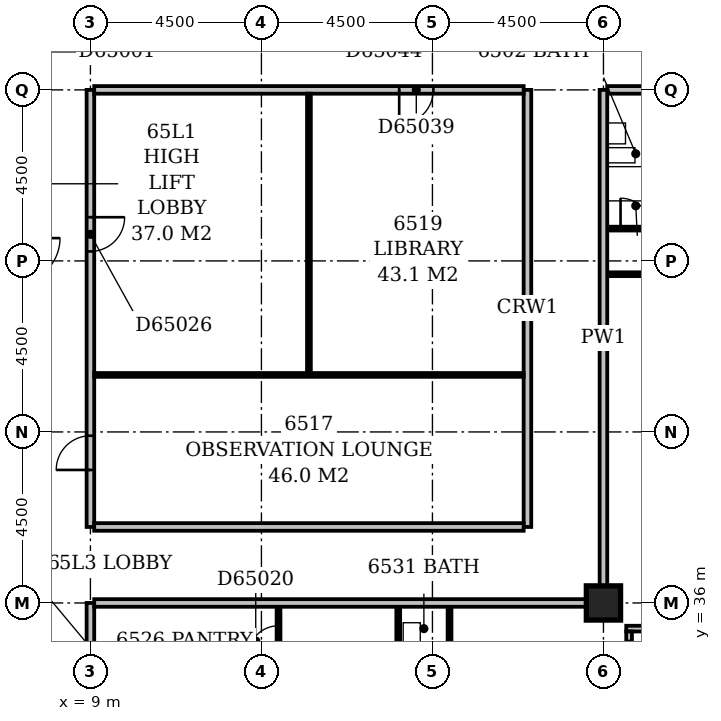
"""IFC4 building model, lengths in metres.
Left out: names, types, materials, properties, quantities, classifications, styles, units other than length and angle.
Written with IfcOpenShell. Run it as: python <this file> out.ifc"""

import sys

from ifc_helpers import new_model, si_unit, direction, frame, frame_2d, origin, origin_2d, place, context, subcontext, project, spatial, rectangle, extrude, element, fill, save


model = new_model("IFC4")
c1 = context("Model", 3, precision=1e-05, world=origin(), true_north=direction((0.0, 1.0)))
c2 = subcontext(c1, "Body", "Model", "MODEL_VIEW")
j1 = project(units=[si_unit("LENGTHUNIT", "METRE"), si_unit("PLANEANGLEUNIT", "RADIAN")], contexts=[c1])
p1 = place(None, origin())
s1 = spatial("IfcSite", under=j1, at=p1, CompositionType="ELEMENT")
p2 = place(p1, origin())
s2 = spatial("IfcBuilding", under=s1, at=p2, CompositionType="ELEMENT")
p3 = place(p2, frame((0.0, 0.0, 251.0)))
s3 = spatial("IfcBuildingStorey", under=s2, at=p3, CompositionType="ELEMENT", Elevation=251.0)
p4 = place(p3, frame((22.5, 36.0, -0.3), z_axis=(0.0, 0.0, 1.0), x_axis=(1.0, 0.0, 0.0)))
e1 = element("IfcColumn", 1, at=p4, inside=s3, PredefinedType="COLUMN", context=c2, shape_type="SweptSolid", body=[
    extrude(rectangle(XDim=0.9, YDim=0.9, at=origin_2d()), origin(), (0.0, 0.0, 1.0), 3.6),
])
p5 = place(p3, frame((23.175, 17.4, 0.0), z_axis=(0.0, 0.0, 1.0), x_axis=(0.0, 1.0, 0.0)))
e2 = element("IfcWall", 2, at=p5, inside=s3, PredefinedType="STANDARD", context=c2, shape_type="SweptSolid", body=[
    extrude(rectangle(XDim=17.85, YDim=0.15, at=frame_2d((8.925, 0.0))), origin(), (0.0, 0.0, 1.0), 2.7),
])
p6 = place(p5, frame((1.65, 0.0, 0.6)))
e3 = element("IfcOpeningElement", 3, at=p6, cuts=e2, PredefinedType="OPENING", context=c2, shape_type="SweptSolid", body=[
    extrude(rectangle(XDim=2.4, YDim=1.8, at=frame_2d((1.2, 0.9))), frame((0.0, 0.087, 0.0), z_axis=(0.0, -1.0, 0.0), x_axis=(1.0, 0.0, 0.0)), (0.0, 0.0, 1.0), 0.174),
])
p7 = place(p5, frame((6.15, 0.0, 0.6)))
e4 = element("IfcOpeningElement", 4, at=p7, cuts=e2, PredefinedType="OPENING", context=c2, shape_type="SweptSolid", body=[
    extrude(rectangle(XDim=2.4, YDim=1.8, at=frame_2d((1.2, 0.9))), frame((0.0, 0.087, 0.0), z_axis=(0.0, -1.0, 0.0), x_axis=(1.0, 0.0, 0.0)), (0.0, 0.0, 1.0), 0.174),
])
p8 = place(p5, frame((10.65, 0.0, 0.6)))
e5 = element("IfcOpeningElement", 5, at=p8, cuts=e2, PredefinedType="OPENING", context=c2, shape_type="SweptSolid", body=[
    extrude(rectangle(XDim=2.4, YDim=1.8, at=frame_2d((1.2, 0.9))), frame((0.0, 0.087, 0.0), z_axis=(0.0, -1.0, 0.0), x_axis=(1.0, 0.0, 0.0)), (0.0, 0.0, 1.0), 0.174),
])
p9 = place(p5, frame((15.202, 0.0, 0.6)))
e6 = element("IfcOpeningElement", 6, at=p9, cuts=e2, PredefinedType="OPENING", context=c2, shape_type="SweptSolid", body=[
    extrude(rectangle(XDim=2.4, YDim=1.8, at=frame_2d((1.2, 0.9))), frame((0.0, 0.087, 0.0), z_axis=(0.0, -1.0, 0.0), x_axis=(1.0, 0.0, 0.0)), (0.0, 0.0, 1.0), 0.174),
])
p10 = place(p3, frame((23.1, 35.325, 0.0), z_axis=(0.0, 0.0, 1.0), x_axis=(1.0, 0.0, 0.0)))
e7 = element("IfcWall", 7, at=p10, inside=s3, PredefinedType="STANDARD", context=c2, shape_type="SweptSolid", body=[
    extrude(rectangle(XDim=18.15, YDim=0.15, at=frame_2d((9.075, 0.0))), origin(), (0.0, 0.0, 1.0), 2.7),
])
p11 = place(p10, frame((0.45, 0.0, 0.6)))
e8 = element("IfcOpeningElement", 8, at=p11, cuts=e7, PredefinedType="OPENING", context=c2, shape_type="SweptSolid", body=[
    extrude(rectangle(XDim=2.4, YDim=1.8, at=frame_2d((1.2, 0.9))), frame((0.0, 0.087, 0.0), z_axis=(0.0, -1.0, 0.0), x_axis=(1.0, 0.0, 0.0)), (0.0, 0.0, 1.0), 0.174),
])
p12 = place(p10, frame((4.95, 0.0, 0.6)))
e9 = element("IfcOpeningElement", 9, at=p12, cuts=e7, PredefinedType="OPENING", context=c2, shape_type="SweptSolid", body=[
    extrude(rectangle(XDim=2.4, YDim=1.8, at=frame_2d((1.2, 0.9))), frame((0.0, 0.087, 0.0), z_axis=(0.0, -1.0, 0.0), x_axis=(1.0, 0.0, 0.0)), (0.0, 0.0, 1.0), 0.174),
])
p13 = place(p10, frame((9.45, 0.0, 0.6)))
e10 = element("IfcOpeningElement", 10, at=p13, cuts=e7, PredefinedType="OPENING", context=c2, shape_type="SweptSolid", body=[
    extrude(rectangle(XDim=2.4, YDim=1.8, at=frame_2d((1.2, 0.9))), frame((0.0, 0.087, 0.0), z_axis=(0.0, -1.0, 0.0), x_axis=(1.0, 0.0, 0.0)), (0.0, 0.0, 1.0), 0.174),
])
p14 = place(p10, frame((14.931, 0.0, 0.6)))
e11 = element("IfcOpeningElement", 11, at=p14, cuts=e7, PredefinedType="OPENING", context=c2, shape_type="SweptSolid", body=[
    extrude(rectangle(XDim=1.8, YDim=1.8, at=frame_2d((0.9, 0.9))), frame((0.0, 0.087, 0.0), z_axis=(0.0, -1.0, 0.0), x_axis=(1.0, 0.0, 0.0)), (0.0, 0.0, 1.0), 0.174),
])
p15 = place(p3, frame((17.1, 17.4, 0.0), z_axis=(0.0, 0.0, 1.0), x_axis=(0.0, 1.0, 0.0)))
e12 = element("IfcWall", 12, at=p15, inside=s3, PredefinedType="PARTITIONING", context=c2, shape_type="SweptSolid", body=[
    extrude(rectangle(XDim=18.5, YDim=0.1, at=frame_2d((9.25, 0.0))), origin(), (0.0, 0.0, 1.0), 3.3),
])
p16 = place(p15, frame((3.55, 0.0, 0.0)))
e13 = element("IfcOpeningElement", 13, at=p16, cuts=e12, PredefinedType="OPENING", context=c2, shape_type="SweptSolid", body=[
    extrude(rectangle(XDim=0.9, YDim=2.1, at=frame_2d((0.45, 1.05))), frame((0.0, 0.062, 0.0), z_axis=(0.0, -1.0, 0.0), x_axis=(1.0, 0.0, 0.0)), (0.0, 0.0, 1.0), 0.124),
])
p17 = place(p15, frame((9.1, 0.0, 0.0)))
e14 = element("IfcOpeningElement", 14, at=p17, cuts=e12, PredefinedType="OPENING", context=c2, shape_type="SweptSolid", body=[
    extrude(rectangle(XDim=0.9, YDim=2.1, at=frame_2d((0.45, 1.05))), frame((0.0, 0.062, 0.0), z_axis=(0.0, -1.0, 0.0), x_axis=(1.0, 0.0, 0.0)), (0.0, 0.0, 1.0), 0.124),
])
p18 = place(p15, frame((14.75, 0.0, 0.0)))
e15 = element("IfcOpeningElement", 15, at=p18, cuts=e12, PredefinedType="OPENING", context=c2, shape_type="SweptSolid", body=[
    extrude(rectangle(XDim=0.9, YDim=2.1, at=frame_2d((0.45, 1.05))), frame((0.0, 0.062, 0.0), z_axis=(0.0, -1.0, 0.0), x_axis=(1.0, 0.0, 0.0)), (0.0, 0.0, 1.0), 0.124),
])
p19 = place(p3, frame((9.0, 18.45, 0.0), z_axis=(0.0, 0.0, 1.0), x_axis=(0.0, 1.0, 0.0)))
e16 = element("IfcWall", 16, at=p19, inside=s3, PredefinedType="PARTITIONING", context=c2, shape_type="SweptSolid", body=[
    extrude(rectangle(XDim=17.55, YDim=0.2, at=frame_2d((8.775, 0.0))), origin(), (0.0, 0.0, 1.0), 3.3),
])
p20 = place(p19, frame((6.75, 0.0, 0.0)))
e17 = element("IfcOpeningElement", 17, at=p20, cuts=e16, PredefinedType="OPENING", context=c2, shape_type="SweptSolid", body=[
    extrude(rectangle(XDim=1.0, YDim=2.1, at=frame_2d((0.5, 1.05))), frame((0.0, 0.112, 0.0), z_axis=(0.0, -1.0, 0.0), x_axis=(1.0, 0.0, 0.0)), (0.0, 0.0, 1.0), 0.224),
])
p21 = place(p3, frame((13.95, 26.5, 0.0), z_axis=(0.0, 0.0, 1.0), x_axis=(0.0, 1.0, 0.0)))
e18 = element("IfcWall", 18, at=p21, inside=s3, PredefinedType="PARTITIONING", context=c2, shape_type="SweptSolid", body=[
    extrude(rectangle(XDim=9.4, YDim=0.1, at=frame_2d((4.7, 0.0))), origin(), (0.0, 0.0, 1.0), 3.3),
])
p22 = place(p21, frame((0.8, 0.0, 0.0)))
e19 = element("IfcOpeningElement", 19, at=p22, cuts=e18, PredefinedType="OPENING", context=c2, shape_type="SweptSolid", body=[
    extrude(rectangle(XDim=0.8, YDim=2.1, at=frame_2d((0.4, 1.05))), frame((0.0, 0.062, 0.0), z_axis=(0.0, -1.0, 0.0), x_axis=(1.0, 0.0, 0.0)), (0.0, 0.0, 1.0), 0.124),
])
p23 = place(p21, frame((8.1, 0.0, 0.0)))
e20 = element("IfcOpeningElement", 20, at=p23, cuts=e18, PredefinedType="OPENING", context=c2, shape_type="SweptSolid", body=[
    extrude(rectangle(XDim=0.8, YDim=2.1, at=frame_2d((0.4, 1.05))), frame((0.0, 0.062, 0.0), z_axis=(0.0, -1.0, 0.0), x_axis=(1.0, 0.0, 0.0)), (0.0, 0.0, 1.0), 0.124),
])
p24 = place(p21, frame((4.3, 0.0, 0.0)))
e21 = element("IfcOpeningElement", 21, at=p24, cuts=e18, PredefinedType="OPENING", context=c2, shape_type="SweptSolid", body=[
    extrude(rectangle(XDim=0.8, YDim=2.1, at=frame_2d((0.4, 1.05))), frame((0.0, 0.062, 0.0), z_axis=(0.0, -1.0, 0.0), x_axis=(1.0, 0.0, 0.0)), (0.0, 0.0, 1.0), 0.124),
])
p25 = place(p21, frame((6.1, 0.0, 0.0)))
e22 = element("IfcOpeningElement", 22, at=p25, cuts=e18, PredefinedType="OPENING", context=c2, shape_type="SweptSolid", body=[
    extrude(rectangle(XDim=0.8, YDim=2.1, at=frame_2d((0.4, 1.05))), frame((0.0, 0.062, 0.0), z_axis=(0.0, -1.0, 0.0), x_axis=(1.0, 0.0, 0.0)), (0.0, 0.0, 1.0), 0.124),
])
p26 = place(p21, frame((2.75, 0.0, 0.0)))
e23 = element("IfcOpeningElement", 23, at=p26, cuts=e18, PredefinedType="OPENING", context=c2, shape_type="SweptSolid", body=[
    extrude(rectangle(XDim=0.8, YDim=2.1, at=frame_2d((0.4, 1.05))), frame((0.0, 0.062, 0.0), z_axis=(0.0, -1.0, 0.0), x_axis=(1.0, 0.0, 0.0)), (0.0, 0.0, 1.0), 0.124),
])
p27 = place(p3, frame((18.45, 33.7, 0.0), z_axis=(0.0, 0.0, 1.0), x_axis=(0.0, 1.0, 0.0)))
e24 = element("IfcWall", 24, at=p27, inside=s3, PredefinedType="PLUMBINGWALL", context=c2, shape_type="SweptSolid", body=[
    extrude(rectangle(XDim=2.2, YDim=0.1, at=frame_2d((1.1, 0.0))), origin(), (0.0, 0.0, 1.0), 3.3),
])
p28 = place(p3, frame((9.1, 36.0, 0.0), z_axis=(0.0, 0.0, 1.0), x_axis=(1.0, 0.0, 0.0)))
e25 = element("IfcWall", 25, at=p28, inside=s3, PredefinedType="PARTITIONING", context=c2, shape_type="SweptSolid", body=[
    extrude(rectangle(XDim=12.95, YDim=0.2, at=frame_2d((6.475, 0.0))), origin(), (0.0, 0.0, 1.0), 3.3),
])
p29 = place(p3, frame((22.5, 36.45, 0.0), z_axis=(0.0, 0.0, 1.0), x_axis=(0.0, 1.0, 0.0)))
e26 = element("IfcWall", 26, at=p29, inside=s3, PredefinedType="PARTITIONING", context=c2, shape_type="SweptSolid", body=[
    extrude(rectangle(XDim=13.05, YDim=0.2, at=frame_2d((6.525, 0.0))), origin(), (0.0, 0.0, 1.0), 3.3),
])
p30 = place(p3, frame((9.0, 38.0, 0.0), z_axis=(0.0, 0.0, 1.0), x_axis=(0.0, 1.0, 0.0)))
e27 = element("IfcWall", 27, at=p30, inside=s3, PredefinedType="PARTITIONING", context=c2, shape_type="SweptSolid", body=[
    extrude(rectangle(XDim=11.5, YDim=0.2, at=frame_2d((5.75, 0.0))), origin(), (0.0, 0.0, 1.0), 3.3),
])
p31 = place(p30, frame((1.5, 0.0, 0.0)))
e28 = element("IfcOpeningElement", 28, at=p31, cuts=e27, PredefinedType="OPENING", context=c2, shape_type="SweptSolid", body=[
    extrude(rectangle(XDim=0.9, YDim=2.1, at=frame_2d((0.45, 1.05))), frame((0.0, 0.112, 0.0), z_axis=(0.0, -1.0, 0.0), x_axis=(1.0, 0.0, 0.0)), (0.0, 0.0, 1.0), 0.224),
])
p32 = place(p30, frame((7.25, 0.0, 0.0)))
e29 = element("IfcOpeningElement", 29, at=p32, cuts=e27, PredefinedType="OPENING", context=c2, shape_type="SweptSolid", body=[
    extrude(rectangle(XDim=0.9, YDim=2.1, at=frame_2d((0.45, 1.05))), frame((0.0, 0.112, 0.0), z_axis=(0.0, -1.0, 0.0), x_axis=(1.0, 0.0, 0.0)), (0.0, 0.0, 1.0), 0.224),
])
p33 = place(p3, frame((9.1, 38.0, 0.0), z_axis=(0.0, 0.0, 1.0), x_axis=(1.0, 0.0, 0.0)))
e30 = element("IfcWall", 30, at=p33, inside=s3, PredefinedType="PARTITIONING", context=c2, shape_type="SweptSolid", body=[
    extrude(rectangle(XDim=11.3, YDim=0.2, at=frame_2d((5.65, 0.0))), origin(), (0.0, 0.0, 1.0), 3.3),
])
p34 = place(p3, frame((20.5, 38.0, 0.0), z_axis=(0.0, 0.0, 1.0), x_axis=(0.0, 1.0, 0.0)))
e31 = element("IfcWall", 31, at=p34, inside=s3, PredefinedType="PARTITIONING", context=c2, shape_type="SweptSolid", body=[
    extrude(rectangle(XDim=11.5, YDim=0.2, at=frame_2d((5.75, 0.0))), origin(), (0.0, 0.0, 1.0), 3.3),
])
p35 = place(p3, frame((9.1, 42.0, 0.0), z_axis=(0.0, 0.0, 1.0), x_axis=(1.0, 0.0, 0.0)))
e32 = element("IfcWall", 32, at=p35, inside=s3, PredefinedType="PARTITIONING", context=c2, shape_type="SweptSolid", body=[
    extrude(rectangle(XDim=11.3, YDim=0.1, at=frame_2d((5.65, 0.0))), origin(), (0.0, 0.0, 1.0), 3.3),
])
p36 = place(p3, frame((14.75, 42.05, 0.0), z_axis=(0.0, 0.0, 1.0), x_axis=(0.0, 1.0, 0.0)))
e33 = element("IfcWall", 33, at=p36, inside=s3, PredefinedType="PARTITIONING", context=c2, shape_type="SweptSolid", body=[
    extrude(rectangle(XDim=7.35, YDim=0.1, at=frame_2d((3.675, 0.0))), origin(), (0.0, 0.0, 1.0), 3.3),
])
p37 = place(p3, frame((22.6, 44.65, 0.0), z_axis=(0.0, 0.0, 1.0), x_axis=(1.0, 0.0, 0.0)))
e34 = element("IfcWall", 34, at=p37, inside=s3, PredefinedType="PARTITIONING", context=c2, shape_type="SweptSolid", body=[
    extrude(rectangle(XDim=4.3, YDim=0.1, at=frame_2d((2.15, 0.0))), origin(), (0.0, 0.0, 1.0), 3.3),
])
p38 = place(p37, frame((1.7, 0.0, 0.0)))
e35 = element("IfcOpeningElement", 35, at=p38, cuts=e34, PredefinedType="OPENING", context=c2, shape_type="SweptSolid", body=[
    extrude(rectangle(XDim=0.9, YDim=2.1, at=frame_2d((0.45, 1.05))), frame((0.0, 0.062, 0.0), z_axis=(0.0, -1.0, 0.0), x_axis=(1.0, 0.0, 0.0)), (0.0, 0.0, 1.0), 0.124),
])
p39 = place(p3, frame((22.6, 45.85, 0.0), z_axis=(0.0, 0.0, 1.0), x_axis=(1.0, 0.0, 0.0)))
e36 = element("IfcWall", 36, at=p39, inside=s3, PredefinedType="PARTITIONING", context=c2, shape_type="SweptSolid", body=[
    extrude(rectangle(XDim=1.55, YDim=0.1, at=frame_2d((0.775, 0.0))), origin(), (0.0, 0.0, 1.0), 3.3),
])
p40 = place(p39, frame((0.35, 0.0, 0.0)))
e37 = element("IfcOpeningElement", 37, at=p40, cuts=e36, PredefinedType="OPENING", context=c2, shape_type="SweptSolid", body=[
    extrude(rectangle(XDim=0.8, YDim=2.1, at=frame_2d((0.4, 1.05))), frame((0.0, 0.062, 0.0), z_axis=(0.0, -1.0, 0.0), x_axis=(1.0, 0.0, 0.0)), (0.0, 0.0, 1.0), 0.124),
])
p41 = place(p3, frame((9.1, 49.5, 0.0), z_axis=(0.0, 0.0, 1.0), x_axis=(1.0, 0.0, 0.0)))
e38 = element("IfcWall", 38, at=p41, inside=s3, PredefinedType="PARTITIONING", context=c2, shape_type="SweptSolid", body=[
    extrude(rectangle(XDim=11.3, YDim=0.2, at=frame_2d((5.65, 0.0))), origin(), (0.0, 0.0, 1.0), 3.3),
])
p42 = place(p41, frame((8.025, 0.0, 0.0)))
e39 = element("IfcOpeningElement", 39, at=p42, cuts=e38, PredefinedType="OPENING", context=c2, shape_type="SweptSolid", body=[
    extrude(rectangle(XDim=0.9, YDim=2.1, at=frame_2d((0.45, 1.05))), frame((0.0, 0.112, 0.0), z_axis=(0.0, -1.0, 0.0), x_axis=(1.0, 0.0, 0.0)), (0.0, 0.0, 1.0), 0.224),
])
p43 = place(p3, frame((22.6, 49.5, 0.0), z_axis=(0.0, 0.0, 1.0), x_axis=(1.0, 0.0, 0.0)))
e40 = element("IfcWall", 40, at=p43, inside=s3, PredefinedType="PARTITIONING", context=c2, shape_type="SweptSolid", body=[
    extrude(rectangle(XDim=21.95, YDim=0.2, at=frame_2d((10.975, 0.0))), origin(), (0.0, 0.0, 1.0), 3.3),
])
p44 = place(p43, frame((1.85, 0.0, 0.0)))
e41 = element("IfcOpeningElement", 41, at=p44, cuts=e40, PredefinedType="OPENING", context=c2, shape_type="SweptSolid", body=[
    extrude(rectangle(XDim=1.0, YDim=2.1, at=frame_2d((0.5, 1.05))), frame((0.0, 0.112, 0.0), z_axis=(0.0, -1.0, 0.0), x_axis=(1.0, 0.0, 0.0)), (0.0, 0.0, 1.0), 0.224),
])
p45 = place(p43, frame((9.7, 0.0, 0.0)))
e42 = element("IfcOpeningElement", 42, at=p45, cuts=e40, PredefinedType="OPENING", context=c2, shape_type="SweptSolid", body=[
    extrude(rectangle(XDim=1.0, YDim=2.1, at=frame_2d((0.5, 1.05))), frame((0.0, 0.112, 0.0), z_axis=(0.0, -1.0, 0.0), x_axis=(1.0, 0.0, 0.0)), (0.0, 0.0, 1.0), 0.224),
])
p46 = place(p43, frame((15.05, 0.0, 0.0)))
e43 = element("IfcOpeningElement", 43, at=p46, cuts=e40, PredefinedType="OPENING", context=c2, shape_type="SweptSolid", body=[
    extrude(rectangle(XDim=1.0, YDim=2.1, at=frame_2d((0.5, 1.05))), frame((0.0, 0.112, 0.0), z_axis=(0.0, -1.0, 0.0), x_axis=(1.0, 0.0, 0.0)), (0.0, 0.0, 1.0), 0.224),
])
p47 = place(p9, origin())
e44 = element("IfcWindow", 44, at=p47, inside=s3, PartitioningType="SINGLE_PANEL", PredefinedType="WINDOW", context=c2, shape_type="SweptSolid", body=[
    extrude(rectangle(XDim=2.4, YDim=1.8, at=frame_2d((1.2, 0.9))), frame((0.0, 0.03, 0.0), z_axis=(0.0, -1.0, 0.0), x_axis=(1.0, 0.0, 0.0)), (0.0, 0.0, 1.0), 0.06),
])
fill(e6, e44)
p48 = place(p23, origin())
e45 = element("IfcDoor", 45, at=p48, inside=s3, OperationType="SINGLE_SWING_LEFT", PredefinedType="DOOR", context=c2, shape_type="SweptSolid", body=[
    extrude(rectangle(XDim=0.8, YDim=2.1, at=frame_2d((0.4, 1.05))), frame((0.0, 0.025, 0.0), z_axis=(0.0, -1.0, 0.0), x_axis=(1.0, 0.0, 0.0)), (0.0, 0.0, 1.0), 0.05),
])
fill(e20, e45)
p49 = place(p31, origin())
e46 = element("IfcDoor", 46, at=p49, inside=s3, OperationType="SINGLE_SWING_LEFT", PredefinedType="DOOR", context=c2, shape_type="SweptSolid", body=[
    extrude(rectangle(XDim=0.9, YDim=2.1, at=frame_2d((0.45, 1.05))), frame((0.0, 0.025, 0.0), z_axis=(0.0, -1.0, 0.0), x_axis=(1.0, 0.0, 0.0)), (0.0, 0.0, 1.0), 0.05),
])
fill(e28, e46)
p50 = place(p32, origin())
e47 = element("IfcDoor", 47, at=p50, inside=s3, OperationType="SINGLE_SWING_RIGHT", PredefinedType="DOOR", context=c2, shape_type="SweptSolid", body=[
    extrude(rectangle(XDim=0.9, YDim=2.1, at=frame_2d((0.45, 1.05))), frame((0.0, 0.025, 0.0), z_axis=(0.0, -1.0, 0.0), x_axis=(1.0, 0.0, 0.0)), (0.0, 0.0, 1.0), 0.05),
])
fill(e29, e47)
p51 = place(p40, origin())
e48 = element("IfcDoor", 48, at=p51, inside=s3, OperationType="SINGLE_SWING_LEFT", PredefinedType="DOOR", context=c2, shape_type="SweptSolid", body=[
    extrude(rectangle(XDim=0.8, YDim=2.1, at=frame_2d((0.4, 1.05))), frame((0.0, 0.025, 0.0), z_axis=(0.0, -1.0, 0.0), x_axis=(1.0, 0.0, 0.0)), (0.0, 0.0, 1.0), 0.05),
])
fill(e37, e48)
p52 = place(p42, frame((0.9, 0.0, 0.0), z_axis=(0.0, 0.0, 1.0), x_axis=(-1.0, 0.0, 0.0)))
e49 = element("IfcDoor", 49, at=p52, inside=s3, OperationType="SINGLE_SWING_RIGHT", PredefinedType="DOOR", context=c2, shape_type="SweptSolid", body=[
    extrude(rectangle(XDim=0.9, YDim=2.1, at=frame_2d((0.45, 1.05))), frame((0.0, 0.025, 0.0), z_axis=(0.0, -1.0, 0.0), x_axis=(1.0, 0.0, 0.0)), (0.0, 0.0, 1.0), 0.05),
])
fill(e39, e49)
save(model, sys.argv[1])
